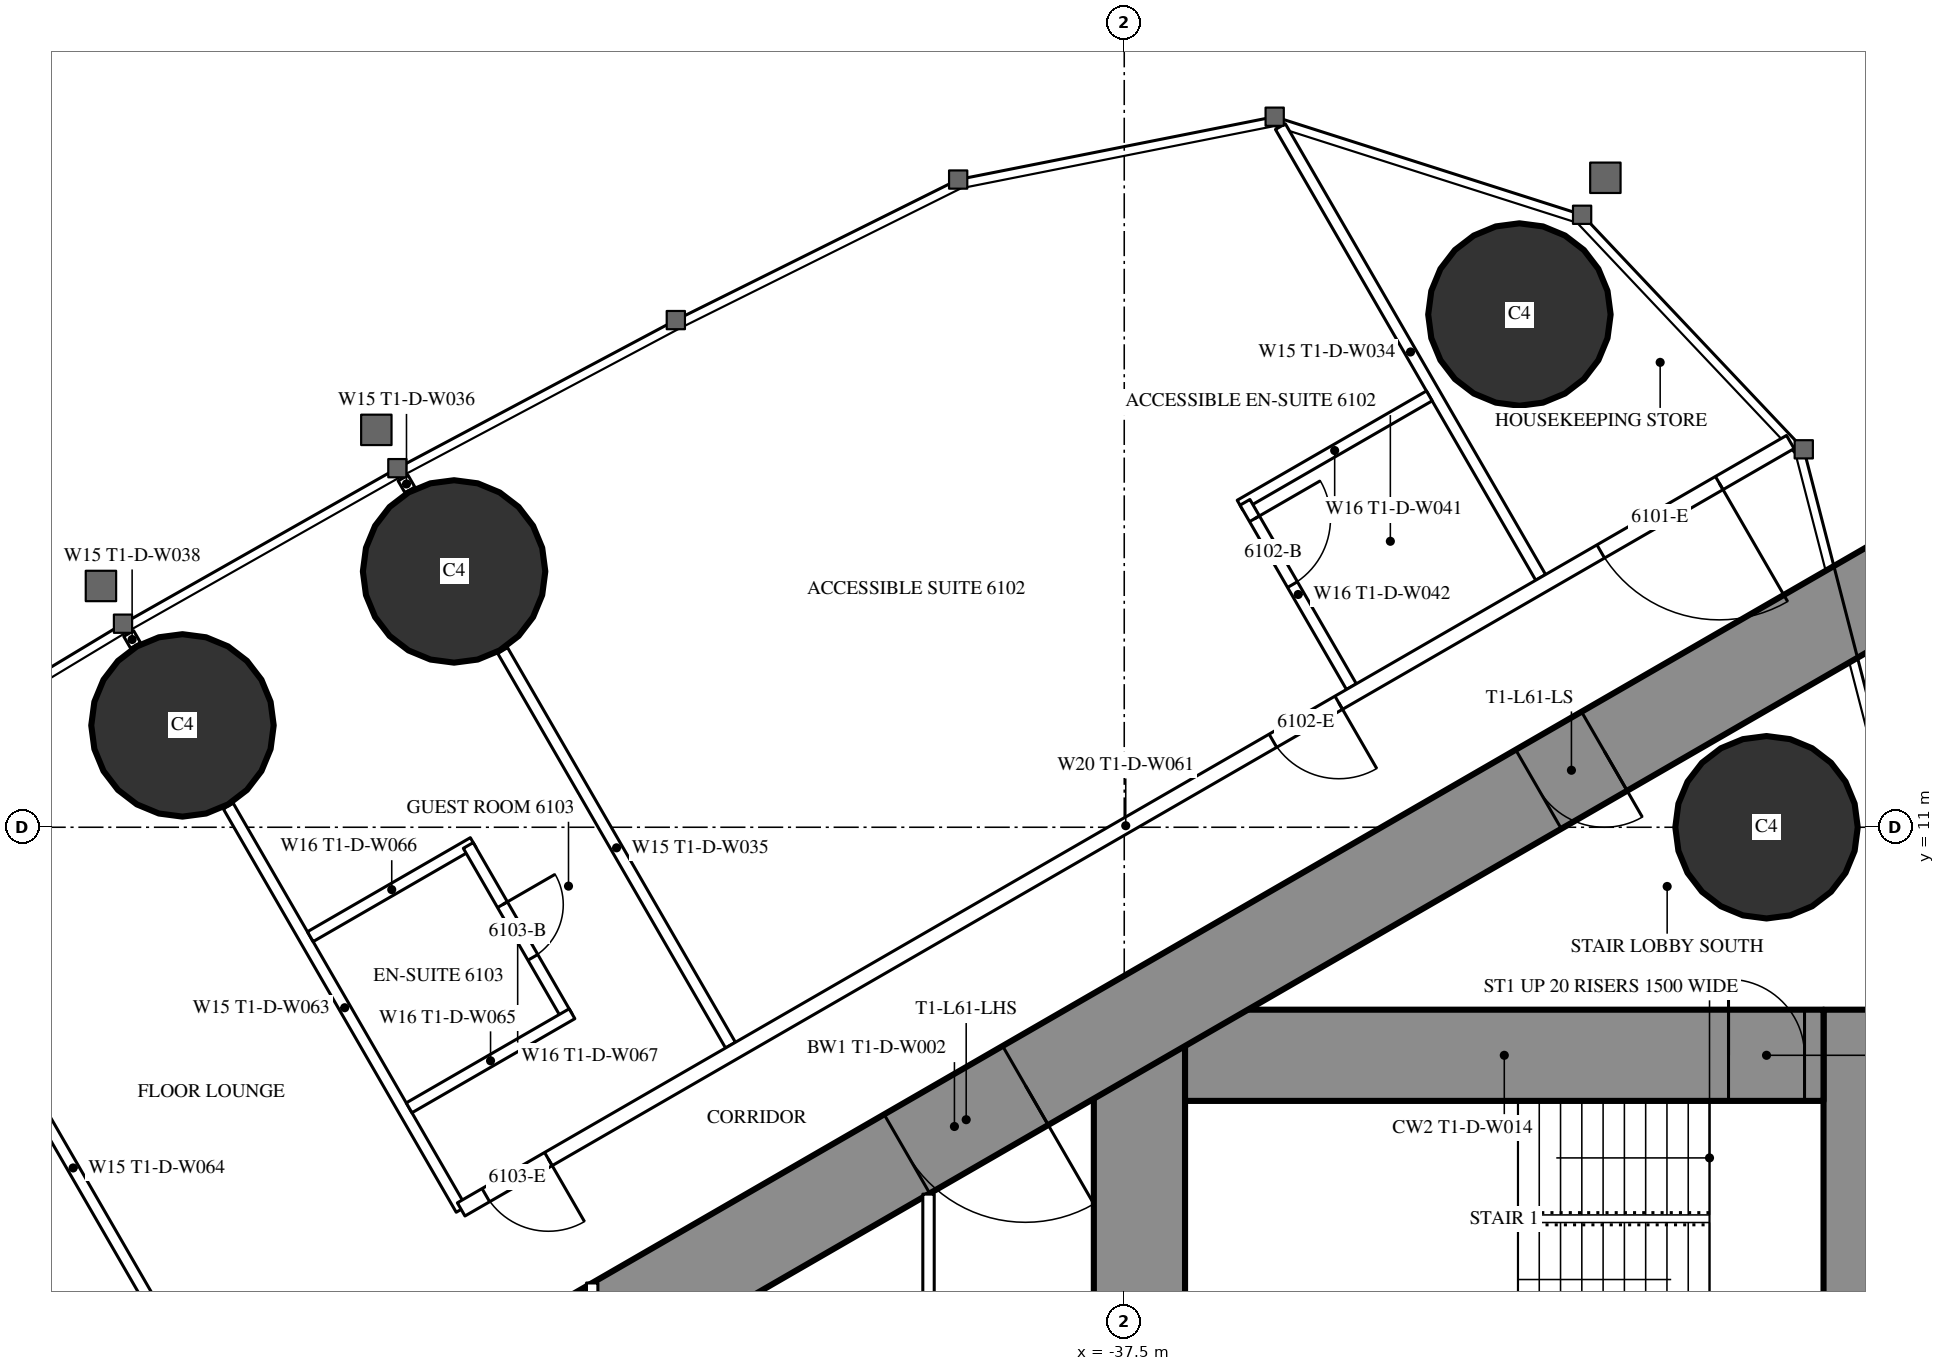
"""IFC4 building model, lengths in metres.
Left out: names, types, materials, properties, quantities, classifications, styles, units other than length and angle.
Written with IfcOpenShell. Run it as: python <this file> out.ifc"""

import sys

from ifc_helpers import new_model, si_unit, direction, frame, frame_2d, origin, origin_2d, place, context, subcontext, project, spatial, rectangle, circle, extrude, element, fill, save


model = new_model("IFC4")
c1 = context("Model", 3, precision=1e-05, world=origin(), true_north=direction((0.0, 1.0)))
c2 = subcontext(c1, "Body", "Model", "MODEL_VIEW")
j1 = project(units=[si_unit("LENGTHUNIT", "METRE"), si_unit("PLANEANGLEUNIT", "RADIAN")], contexts=[c1])
p1 = place(None, origin())
s1 = spatial("IfcSite", under=j1, at=p1, CompositionType="ELEMENT")
p2 = place(p1, origin())
s2 = spatial("IfcBuilding", under=s1, at=p2, CompositionType="ELEMENT")
p3 = place(p2, frame((0.0, 0.0, 229.7)))
s3 = spatial("IfcBuildingStorey", under=s2, at=p3, CompositionType="ELEMENT", Elevation=229.7)
for number, where, z_axis, x_axis in (
    (1, (-32.301, 17.745, 0.0), (0.0, 0.0, 1.0), (1.0, 0.0, 0.0)),
    (2, (-29.05, 11.0, 0.0), (0.0, 0.0, 1.0), (1.0, 0.0, 0.0)),
    (3, (-46.317, 14.365, 0.0), (0.0, 0.0, 1.0), (1.0, 0.0, 0.0)),
    (4, (-49.89, 12.34, 0.0), (0.0, 0.0, 1.0), (1.0, 0.0, 0.0)),
):
    element("IfcColumn", number, at=place(p3, frame(where, z_axis=z_axis, x_axis=x_axis)), inside=s3, PredefinedType="COLUMN", context=c2, shape_type="SweptSolid", body=[
        extrude(circle(Radius=1.2, at=origin_2d()), origin(), (0.0, 0.0, 1.0), 3.6),
    ])
p4 = place(p3, frame((-27.9, 8.6, 0.0), z_axis=(0.0, 0.0, 1.0), x_axis=(0.0, -1.0, 0.0)))
e5 = element("IfcWall", 5, at=p4, inside=s3, PredefinedType="SHEAR", context=c2, shape_type="SweptSolid", body=[
    extrude(rectangle(XDim=17.2, YDim=0.8, at=frame_2d((8.6, 0.0))), origin(), (0.0, 0.0, 1.0), 3.6),
])
p5 = place(p4, frame((6.95, 0.0, 0.0)))
e6 = element("IfcOpeningElement", 6, at=p5, cuts=e5, PredefinedType="OPENING", context=c2, shape_type="SweptSolid", body=[
    extrude(rectangle(XDim=0.9, YDim=2.2, at=frame_2d((0.45, 1.1))), frame((0.0, 0.41, 0.0), z_axis=(0.0, -1.0, 0.0), x_axis=(1.0, 0.0, 0.0)), (0.0, 0.0, 1.0), 0.82),
])
p6 = place(p3, frame((-37.3, 8.6, 0.0), z_axis=(0.0, 0.0, 1.0), x_axis=(0.0, -1.0, 0.0)))
e7 = element("IfcWall", 7, at=p6, inside=s3, PredefinedType="SHEAR", context=c2, shape_type="SweptSolid", body=[
    extrude(rectangle(XDim=17.2, YDim=1.2, at=frame_2d((8.6, 0.0))), origin(), (0.0, 0.0, 1.0), 3.6),
])
p7 = place(p6, frame((7.7, 0.0, 0.0)))
e8 = element("IfcOpeningElement", 8, at=p7, cuts=e7, PredefinedType="OPENING", context=c2, shape_type="SweptSolid", body=[
    extrude(rectangle(XDim=1.8, YDim=2.2, at=frame_2d((0.9, 1.1))), frame((0.0, 0.61, 0.0), z_axis=(0.0, -1.0, 0.0), x_axis=(1.0, 0.0, 0.0)), (0.0, 0.0, 1.0), 1.22),
])
p8 = place(p3, frame((-28.3, 8.0, 0.0), z_axis=(0.0, 0.0, 1.0), x_axis=(-1.0, 0.0, 0.0)))
e9 = element("IfcWall", 9, at=p8, inside=s3, PredefinedType="SHEAR", context=c2, shape_type="SweptSolid", body=[
    extrude(rectangle(XDim=8.4, YDim=1.2, at=frame_2d((4.2, 0.0))), origin(), (0.0, 0.0, 1.0), 3.6),
])
p9 = place(p8, frame((0.25, 0.0, 0.0)))
e10 = element("IfcOpeningElement", 10, at=p9, cuts=e9, PredefinedType="OPENING", context=c2, shape_type="SweptSolid", body=[
    extrude(rectangle(XDim=1.0, YDim=2.2, at=frame_2d((0.5, 1.1))), frame((0.0, 0.61, 0.0), z_axis=(0.0, -1.0, 0.0), x_axis=(1.0, 0.0, 0.0)), (0.0, 0.0, 1.0), 1.22),
])
p10 = place(p3, frame((-27.2, 14.3, 0.0), z_axis=(0.0, 0.0, 1.0), x_axis=(-0.866026593062, -0.499997940104, 0.0)))
e11 = element("IfcWall", 11, at=p10, inside=s3, PredefinedType="SHEAR", context=c2, shape_type="SweptSolid", body=[
    extrude(rectangle(XDim=28.946, YDim=1.2, at=frame_2d((14.473, 0.0))), origin(), (0.0, 0.0, 1.0), 3.6),
])
p11 = place(p10, frame((4.6, 0.0, 0.0)))
e12 = element("IfcOpeningElement", 12, at=p11, cuts=e11, PredefinedType="OPENING", context=c2, shape_type="SweptSolid", body=[
    extrude(rectangle(XDim=1.0, YDim=2.2, at=frame_2d((0.5, 1.1))), frame((0.0, 0.61, 0.0), z_axis=(0.0, -1.0, 0.0), x_axis=(1.0, 0.0, 0.0)), (0.0, 0.0, 1.0), 1.22),
])
p12 = place(p10, frame((13.395, 0.0, 0.0)))
e13 = element("IfcOpeningElement", 13, at=p12, cuts=e11, PredefinedType="OPENING", context=c2, shape_type="SweptSolid", body=[
    extrude(rectangle(XDim=1.8, YDim=2.2, at=frame_2d((0.9, 1.1))), frame((0.0, 0.61, 0.0), z_axis=(0.0, -1.0, 0.0), x_axis=(1.0, 0.0, 0.0)), (0.0, 0.0, 1.0), 1.22),
])
p13 = place(p3, frame((-32.022, 14.287, 0.0), z_axis=(0.0, 0.0, 1.0), x_axis=(-0.50000019414, 0.866025291697, 0.0)))
e14 = element("IfcWall", 14, at=p13, inside=s3, PredefinedType="PARTITIONING", context=c2, shape_type="SweptSolid", body=[
    extrude(rectangle(XDim=6.848, YDim=0.15, at=frame_2d((3.424, 0.0))), origin(), (0.0, 0.0, 1.0), 3.35),
])
p14 = place(p3, frame((-42.68, 8.134, 0.0), z_axis=(0.0, 0.0, 1.0), x_axis=(-0.499984479505, 0.866034364361, 0.0)))
e15 = element("IfcWall", 15, at=p14, inside=s3, PredefinedType="PARTITIONING", context=c2, shape_type="SweptSolid", body=[
    extrude(rectangle(XDim=5.995, YDim=0.15, at=frame_2d((2.998, 0.0))), origin(), (0.0, 0.0, 1.0), 2.45),
])
p15 = place(p3, frame((-46.898, 15.439, 0.0), z_axis=(0.0, 0.0, 1.0), x_axis=(-0.500232303069, 0.865891241997, 0.0)))
e16 = element("IfcWall", 16, at=p15, inside=s3, PredefinedType="PARTITIONING", context=c2, shape_type="SweptSolid", body=[
    extrude(rectangle(XDim=0.18, YDim=0.15, at=frame_2d((0.09, 0.0))), origin(), (0.0, 0.0, 1.0), 2.45),
])
p16 = place(p3, frame((-46.224, 5.972, 0.0), z_axis=(0.0, 0.0, 1.0), x_axis=(-0.500021351822, 0.866013075953, 0.0)))
e17 = element("IfcWall", 17, at=p16, inside=s3, PredefinedType="PARTITIONING", context=c2, shape_type="SweptSolid", body=[
    extrude(rectangle(XDim=6.128, YDim=0.15, at=frame_2d((3.064, 0.0))), origin(), (0.0, 0.0, 1.0), 2.45),
])
p17 = place(p3, frame((-50.508, 13.392, 0.0), z_axis=(0.0, 0.0, 1.0), x_axis=(-0.499644091975, 0.866230789891, 0.0)))
e18 = element("IfcWall", 18, at=p17, inside=s3, PredefinedType="PARTITIONING", context=c2, shape_type="SweptSolid", body=[
    extrude(rectangle(XDim=0.18, YDim=0.15, at=frame_2d((0.09, 0.0))), origin(), (0.0, 0.0, 1.0), 2.45),
])
p18 = place(p3, frame((-49.816, 3.898, 0.0), z_axis=(0.0, 0.0, 1.0), x_axis=(-0.500001913541, 0.866024298998, 0.0)))
e19 = element("IfcWall", 19, at=p18, inside=s3, PredefinedType="PARTITIONING", context=c2, shape_type="SweptSolid", body=[
    extrude(rectangle(XDim=6.05, YDim=0.15, at=frame_2d((3.025, 0.0))), origin(), (0.0, 0.0, 1.0), 2.45),
])
p19 = place(p3, frame((-33.487, 16.675, 0.0), z_axis=(0.0, 0.0, 1.0), x_axis=(-0.866039941686, -0.499974818771, 0.0)))
e20 = element("IfcWall", 20, at=p19, inside=s3, PredefinedType="PARTITIONING", context=c2, shape_type="SweptSolid", body=[
    extrude(rectangle(XDim=2.875, YDim=0.15, at=frame_2d((1.438, 0.0))), origin(), (0.0, 0.0, 1.0), 3.35),
])
p20 = place(p3, frame((-34.511, 12.85, 0.0), z_axis=(0.0, 0.0, 1.0), x_axis=(-0.500011755427, 0.866018616679, 0.0)))
e21 = element("IfcWall", 21, at=p20, inside=s3, PredefinedType="PARTITIONING", context=c2, shape_type="SweptSolid", body=[
    extrude(rectangle(XDim=2.8, YDim=0.15, at=frame_2d((1.4, 0.0))), origin(), (0.0, 0.0, 1.0), 3.35),
])
p21 = place(p20, frame((1.55, 0.0, 0.0)))
e22 = element("IfcOpeningElement", 22, at=p21, cuts=e21, PredefinedType="OPENING", context=c2, shape_type="SweptSolid", body=[
    extrude(rectangle(XDim=1.0, YDim=2.2, at=frame_2d((0.5, 1.1))), frame((0.0, 0.085, 0.0), z_axis=(0.0, -1.0, 0.0), x_axis=(1.0, 0.0, 0.0)), (0.0, 0.0, 1.0), 0.17),
])
p22 = place(p3, frame((-46.065, 10.798, 0.0), z_axis=(0.0, 0.0, 1.0), x_axis=(-0.866031185235, -0.4999899861, 0.0)))
e23 = element("IfcWall", 23, at=p22, inside=s3, PredefinedType="PARTITIONING", context=c2, shape_type="SweptSolid", body=[
    extrude(rectangle(XDim=2.475, YDim=0.15, at=frame_2d((1.238, 0.0))), origin(), (0.0, 0.0, 1.0), 3.35),
])
p23 = place(p3, frame((-44.83, 8.509, 0.0), z_axis=(0.0, 0.0, 1.0), x_axis=(-0.499936506574, 0.866062058628, 0.0)))
e24 = element("IfcWall", 24, at=p23, inside=s3, PredefinedType="PARTITIONING", context=c2, shape_type="SweptSolid", body=[
    extrude(rectangle(XDim=2.6, YDim=0.15, at=frame_2d((1.3, 0.0))), origin(), (0.0, 0.0, 1.0), 3.35),
])
p24 = place(p23, frame((0.9, 0.0, 0.0)))
e25 = element("IfcOpeningElement", 25, at=p24, cuts=e24, PredefinedType="OPENING", context=c2, shape_type="SweptSolid", body=[
    extrude(rectangle(XDim=0.8, YDim=2.2, at=frame_2d((0.4, 1.1))), frame((0.0, 0.085, 0.0), z_axis=(0.0, -1.0, 0.0), x_axis=(1.0, 0.0, 0.0)), (0.0, 0.0, 1.0), 0.17),
])
p25 = place(p3, frame((-44.765, 8.546, 0.0), z_axis=(0.0, 0.0, 1.0), x_axis=(-0.86604923931, -0.499958713387, 0.0)))
e26 = element("IfcWall", 26, at=p25, inside=s3, PredefinedType="PARTITIONING", context=c2, shape_type="SweptSolid", body=[
    extrude(rectangle(XDim=2.475, YDim=0.15, at=frame_2d((1.237, 0.0))), origin(), (0.0, 0.0, 1.0), 3.35),
])
p26 = place(p3, frame((-28.737, 16.068, 0.0), z_axis=(0.0, 0.0, 1.0), x_axis=(-0.866023901326, -0.500002602325, 0.0)))
e27 = element("IfcWall", 27, at=p26, inside=s3, PredefinedType="PARTITIONING", context=c2, shape_type="SweptSolid", body=[
    extrude(rectangle(XDim=20.192, YDim=0.2, at=frame_2d((10.096, 0.0))), origin(), (0.0, 0.0, 1.0), 3.35),
])
p27 = place(p26, frame((1.08, 0.0, 0.0)))
e28 = element("IfcOpeningElement", 28, at=p27, cuts=e27, PredefinedType="OPENING", context=c2, shape_type="SweptSolid", body=[
    extrude(rectangle(XDim=1.8, YDim=2.04, at=frame_2d((0.9, 1.02))), frame((0.0, 0.11, 0.0), z_axis=(0.0, -1.0, 0.0), x_axis=(1.0, 0.0, 0.0)), (0.0, 0.0, 1.0), 0.22),
])
p28 = place(p26, frame((6.86, 0.0, 0.0)))
e29 = element("IfcOpeningElement", 29, at=p28, cuts=e27, PredefinedType="OPENING", context=c2, shape_type="SweptSolid", body=[
    extrude(rectangle(XDim=1.0, YDim=2.2, at=frame_2d((0.5, 1.1))), frame((0.0, 0.11, 0.0), z_axis=(0.0, -1.0, 0.0), x_axis=(1.0, 0.0, 0.0)), (0.0, 0.0, 1.0), 0.22),
])
p29 = place(p26, frame((18.867, 0.0, 0.0)))
e30 = element("IfcOpeningElement", 30, at=p29, cuts=e27, PredefinedType="OPENING", context=c2, shape_type="SweptSolid", body=[
    extrude(rectangle(XDim=0.95, YDim=2.2, at=frame_2d((0.475, 1.1))), frame((0.0, 0.11, 0.0), z_axis=(0.0, -1.0, 0.0), x_axis=(1.0, 0.0, 0.0)), (0.0, 0.0, 1.0), 0.22),
])
p30 = place(p3, frame((-40.075, 6.174, 0.0), z_axis=(0.0, 0.0, 1.0), x_axis=(0.0, -1.0, 0.0)))
e31 = element("IfcWall", 31, at=p30, inside=s3, PredefinedType="PARTITIONING", context=c2, shape_type="SweptSolid", body=[
    extrude(rectangle(XDim=12.348, YDim=0.15, at=frame_2d((6.174, 0.0))), origin(), (0.0, 0.0, 1.0), 3.35),
])
p31 = place(p30, frame((5.274, 0.0, 0.0)))
e32 = element("IfcOpeningElement", 32, at=p31, cuts=e31, PredefinedType="OPENING", context=c2, shape_type="SweptSolid", body=[
    extrude(rectangle(XDim=1.8, YDim=2.2, at=frame_2d((0.9, 1.1))), frame((0.0, 0.085, 0.0), z_axis=(0.0, -1.0, 0.0), x_axis=(1.0, 0.0, 0.0)), (0.0, 0.0, 1.0), 0.17),
])
p32 = place(p3, frame((-44.5, 5.005, 0.0), z_axis=(0.0, 0.0, 1.0), x_axis=(0.0, -1.0, 0.0)))
e33 = element("IfcWall", 33, at=p32, inside=s3, PredefinedType="PARTITIONING", context=c2, shape_type="SweptSolid", body=[
    extrude(rectangle(XDim=10.009, YDim=0.15, at=frame_2d((5.005, 0.0))), origin(), (0.0, 0.0, 1.0), 2.5),
])
p33 = place(p32, frame((4.505, 0.0, 0.0)))
e34 = element("IfcOpeningElement", 34, at=p33, cuts=e33, PredefinedType="OPENING", context=c2, shape_type="SweptSolid", body=[
    extrude(rectangle(XDim=1.0, YDim=2.2, at=frame_2d((0.5, 1.1))), frame((0.0, 0.085, 0.0), z_axis=(0.0, -1.0, 0.0), x_axis=(1.0, 0.0, 0.0)), (0.0, 0.0, 1.0), 0.17),
])
p34 = place(p27, origin())
e35 = element("IfcDoor", 35, at=p34, inside=s3, OperationType="DOUBLE_DOOR_SINGLE_SWING", PredefinedType="DOOR", context=c2, shape_type="SweptSolid", body=[
    extrude(rectangle(XDim=1.8, YDim=2.04, at=frame_2d((0.9, 1.02))), frame((0.0, 0.025, 0.0), z_axis=(0.0, -1.0, 0.0), x_axis=(1.0, 0.0, 0.0)), (0.0, 0.0, 1.0), 0.05),
])
fill(e28, e35)
p35 = place(p21, origin())
e36 = element("IfcDoor", 36, at=p35, inside=s3, OperationType="SINGLE_SWING_RIGHT", PredefinedType="DOOR", context=c2, shape_type="SweptSolid", body=[
    extrude(rectangle(XDim=1.0, YDim=2.2, at=frame_2d((0.5, 1.1))), frame((0.0, 0.025, 0.0), z_axis=(0.0, -1.0, 0.0), x_axis=(1.0, 0.0, 0.0)), (0.0, 0.0, 1.0), 0.05),
])
fill(e22, e36)
p36 = place(p28, origin())
e37 = element("IfcDoor", 37, at=p36, inside=s3, OperationType="SINGLE_SWING_LEFT", PredefinedType="DOOR", context=c2, shape_type="SweptSolid", body=[
    extrude(rectangle(XDim=1.0, YDim=2.2, at=frame_2d((0.5, 1.1))), frame((0.0, 0.025, 0.0), z_axis=(0.0, -1.0, 0.0), x_axis=(1.0, 0.0, 0.0)), (0.0, 0.0, 1.0), 0.05),
])
fill(e29, e37)
p37 = place(p24, origin())
e38 = element("IfcDoor", 38, at=p37, inside=s3, OperationType="SINGLE_SWING_RIGHT", PredefinedType="DOOR", context=c2, shape_type="SweptSolid", body=[
    extrude(rectangle(XDim=0.8, YDim=2.2, at=frame_2d((0.4, 1.1))), frame((0.0, 0.025, 0.0), z_axis=(0.0, -1.0, 0.0), x_axis=(1.0, 0.0, 0.0)), (0.0, 0.0, 1.0), 0.05),
])
fill(e25, e38)
p38 = place(p29, origin())
e39 = element("IfcDoor", 39, at=p38, inside=s3, OperationType="SINGLE_SWING_LEFT", PredefinedType="DOOR", context=c2, shape_type="SweptSolid", body=[
    extrude(rectangle(XDim=0.95, YDim=2.2, at=frame_2d((0.475, 1.1))), frame((0.0, 0.025, 0.0), z_axis=(0.0, -1.0, 0.0), x_axis=(1.0, 0.0, 0.0)), (0.0, 0.0, 1.0), 0.05),
])
fill(e30, e39)
p39 = place(p11, origin())
e40 = element("IfcDoor", 40, at=p39, inside=s3, OperationType="SINGLE_SWING_LEFT", PredefinedType="DOOR", context=c2, shape_type="SweptSolid", body=[
    extrude(rectangle(XDim=1.0, YDim=2.2, at=frame_2d((0.5, 1.1))), frame((0.0, 0.025, 0.0), z_axis=(0.0, -1.0, 0.0), x_axis=(1.0, 0.0, 0.0)), (0.0, 0.0, 1.0), 0.05),
])
fill(e12, e40)
p40 = place(p12, origin())
e41 = element("IfcDoor", 41, at=p40, inside=s3, OperationType="DOUBLE_DOOR_SINGLE_SWING", PredefinedType="DOOR", context=c2, shape_type="SweptSolid", body=[
    extrude(rectangle(XDim=1.8, YDim=2.2, at=frame_2d((0.9, 1.1))), frame((0.0, 0.025, 0.0), z_axis=(0.0, -1.0, 0.0), x_axis=(1.0, 0.0, 0.0)), (0.0, 0.0, 1.0), 0.05),
])
fill(e13, e41)
p41 = place(p9, origin())
e42 = element("IfcDoor", 42, at=p41, inside=s3, OperationType="SINGLE_SWING_RIGHT", PredefinedType="DOOR", context=c2, shape_type="SweptSolid", body=[
    extrude(rectangle(XDim=1.0, YDim=2.2, at=frame_2d((0.5, 1.1))), frame((0.0, 0.025, 0.0), z_axis=(0.0, -1.0, 0.0), x_axis=(1.0, 0.0, 0.0)), (0.0, 0.0, 1.0), 0.05),
])
fill(e10, e42)
save(model, sys.argv[1])
